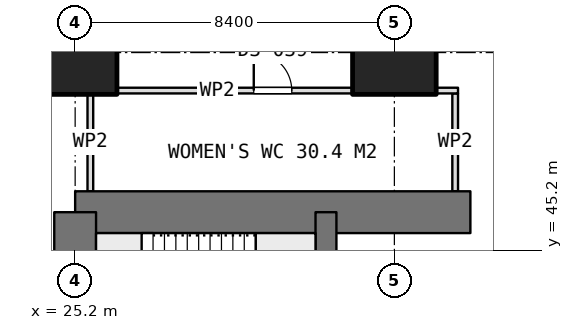
"""IFC4 building model, lengths in metres.
Left out: names, types, materials, properties, quantities, classifications, styles, units other than length and angle.
Written with IfcOpenShell. Run it as: python <this file> out.ifc"""

import sys

from ifc_helpers import new_model, si_unit, direction, frame, frame_2d, origin, origin_2d, place, context, subcontext, project, spatial, rectangle, extrude, element, fill, save


model = new_model("IFC4")
c1 = context("Model", 3, precision=1e-05, world=origin(), true_north=direction((0.0, 1.0)))
c2 = subcontext(c1, "Body", "Model", "MODEL_VIEW")
j1 = project(units=[si_unit("LENGTHUNIT", "METRE"), si_unit("PLANEANGLEUNIT", "RADIAN")], contexts=[c1])
p1 = place(None, origin())
s1 = spatial("IfcSite", under=j1, at=p1, CompositionType="ELEMENT")
p2 = place(p1, origin())
s2 = spatial("IfcBuilding", under=s1, at=p2, CompositionType="ELEMENT")
p3 = place(p2, frame((0.0, 0.0, 32.9)))
s3 = spatial("IfcBuildingStorey", under=s2, at=p3, CompositionType="ELEMENT", Elevation=32.9)
p4 = place(p3, frame((25.2, 46.2, 0.0), z_axis=(0.0, 0.0, 1.0), x_axis=(1.0, 0.0, 0.0)))
e1 = element("IfcWall", 1, at=p4, inside=s3, PredefinedType="SHEAR", context=c2, shape_type="SweptSolid", body=[
    extrude(rectangle(XDim=10.4, YDim=1.1, at=frame_2d((5.2, 0.0))), origin(), (0.0, 0.0, 1.0), 3.75),
])
p5 = place(p3, frame((25.2, 21.0, 0.0), z_axis=(0.0, 0.0, 1.0), x_axis=(0.0, 1.0, 0.0)))
e2 = element("IfcWall", 2, at=p5, inside=s3, PredefinedType="SHEAR", context=c2, shape_type="SweptSolid", body=[
    extrude(rectangle(XDim=25.2, YDim=1.1, at=frame_2d((12.6, 0.0))), origin(), (0.0, 0.0, 1.0), 3.75),
])
p6 = place(p5, frame((7.8, 0.0, 0.0)))
e3 = element("IfcOpeningElement", 3, at=p6, cuts=e2, PredefinedType="OPENING", context=c2, shape_type="SweptSolid", body=[
    extrude(rectangle(XDim=1.2, YDim=2.1, at=frame_2d((0.6, 1.05))), frame((0.0, 0.56, 0.0), z_axis=(0.0, -1.0, 0.0), x_axis=(1.0, 0.0, 0.0)), (0.0, 0.0, 1.0), 1.12),
])
p7 = place(p5, frame((14.25, 0.0, 0.0)))
e4 = element("IfcOpeningElement", 4, at=p7, cuts=e2, PredefinedType="OPENING", context=c2, shape_type="SweptSolid", body=[
    extrude(rectangle(XDim=0.9, YDim=2.1, at=frame_2d((0.45, 1.05))), frame((0.0, 0.56, 0.0), z_axis=(0.0, -1.0, 0.0), x_axis=(1.0, 0.0, 0.0)), (0.0, 0.0, 1.0), 1.12),
])
p8 = place(p5, frame((16.85, 0.0, 0.0)))
e5 = element("IfcOpeningElement", 5, at=p8, cuts=e2, PredefinedType="OPENING", context=c2, shape_type="SweptSolid", body=[
    extrude(rectangle(XDim=0.9, YDim=2.1, at=frame_2d((0.45, 1.05))), frame((0.0, 0.56, 0.0), z_axis=(0.0, -1.0, 0.0), x_axis=(1.0, 0.0, 0.0)), (0.0, 0.0, 1.0), 1.12),
])
p9 = place(p5, frame((19.075, 0.0, 0.0)))
e6 = element("IfcOpeningElement", 6, at=p9, cuts=e2, PredefinedType="OPENING", context=c2, shape_type="SweptSolid", body=[
    extrude(rectangle(XDim=1.2, YDim=2.1, at=frame_2d((0.6, 1.05))), frame((0.0, 0.56, 0.0), z_axis=(0.0, -1.0, 0.0), x_axis=(1.0, 0.0, 0.0)), (0.0, 0.0, 1.0), 1.12),
])
p10 = place(p3, frame((31.8, 21.0, 0.0), z_axis=(0.0, 0.0, 1.0), x_axis=(0.0, 1.0, 0.0)))
e7 = element("IfcWall", 7, at=p10, inside=s3, PredefinedType="SHEAR", context=c2, shape_type="SweptSolid", body=[
    extrude(rectangle(XDim=25.2, YDim=0.55, at=frame_2d((12.6, 0.0))), origin(), (0.0, 0.0, 1.0), 3.75),
])
for number, where, z_axis, x_axis in (
    (8, (25.2, 50.4, 0.0), (0.0, 0.0, 1.0), (1.0, 0.0, 0.0)),
    (9, (33.6, 50.4, 0.0), (0.0, 0.0, 1.0), (1.0, 0.0, 0.0)),
):
    element("IfcColumn", number, at=place(p3, frame(where, z_axis=z_axis, x_axis=x_axis)), inside=s3, PredefinedType="COLUMN", context=c2, shape_type="SweptSolid", body=[
        extrude(rectangle(XDim=2.2, YDim=2.2, at=origin_2d()), origin(), (0.0, 0.0, 1.0), 3.75),
    ])
p11 = place(p3, frame((25.525, 49.4, 0.0), z_axis=(0.0, 0.0, 1.0), x_axis=(1.0, 0.0, 0.0)))
e10 = element("IfcWall", 10, at=p11, inside=s3, PredefinedType="PARTITIONING", context=c2, shape_type="SweptSolid", body=[
    extrude(rectangle(XDim=9.75, YDim=0.15, at=frame_2d((4.875, 0.0))), origin(), (0.0, 0.0, 1.0), 3.5),
])
p12 = place(p11, frame((4.375, 0.0, 0.0)))
e11 = element("IfcOpeningElement", 11, at=p12, cuts=e10, PredefinedType="OPENING", context=c2, shape_type="SweptSolid", body=[
    extrude(rectangle(XDim=1.0, YDim=2.1, at=frame_2d((0.5, 1.05))), frame((0.0, 0.085, 0.0), z_axis=(0.0, -1.0, 0.0), x_axis=(1.0, 0.0, 0.0)), (0.0, 0.0, 1.0), 0.17),
])
for number, where, z_axis, x_axis in (
    (12, (25.6, 46.75, 0.0), (0.0, 0.0, 1.0), (0.0, 1.0, 0.0)),
    (13, (35.2, 46.75, 0.0), (0.0, 0.0, 1.0), (0.0, 1.0, 0.0)),
):
    element("IfcWall", number, at=place(p3, frame(where, z_axis=z_axis, x_axis=x_axis)), inside=s3, PredefinedType="PARTITIONING", context=c2, shape_type="SweptSolid", body=[
        extrude(rectangle(XDim=2.575, YDim=0.15, at=frame_2d((1.288, 0.0))), origin(), (0.0, 0.0, 1.0), 3.5),
    ])
p13 = place(p12, origin())
e14 = element("IfcDoor", 14, at=p13, inside=s3, OperationType="SINGLE_SWING_LEFT", PredefinedType="DOOR", context=c2, shape_type="SweptSolid", body=[
    extrude(rectangle(XDim=1.0, YDim=2.1, at=frame_2d((0.5, 1.05))), frame((0.0, 0.025, 0.0), z_axis=(0.0, -1.0, 0.0), x_axis=(1.0, 0.0, 0.0)), (0.0, 0.0, 1.0), 0.05),
])
fill(e11, e14)
save(model, sys.argv[1])
